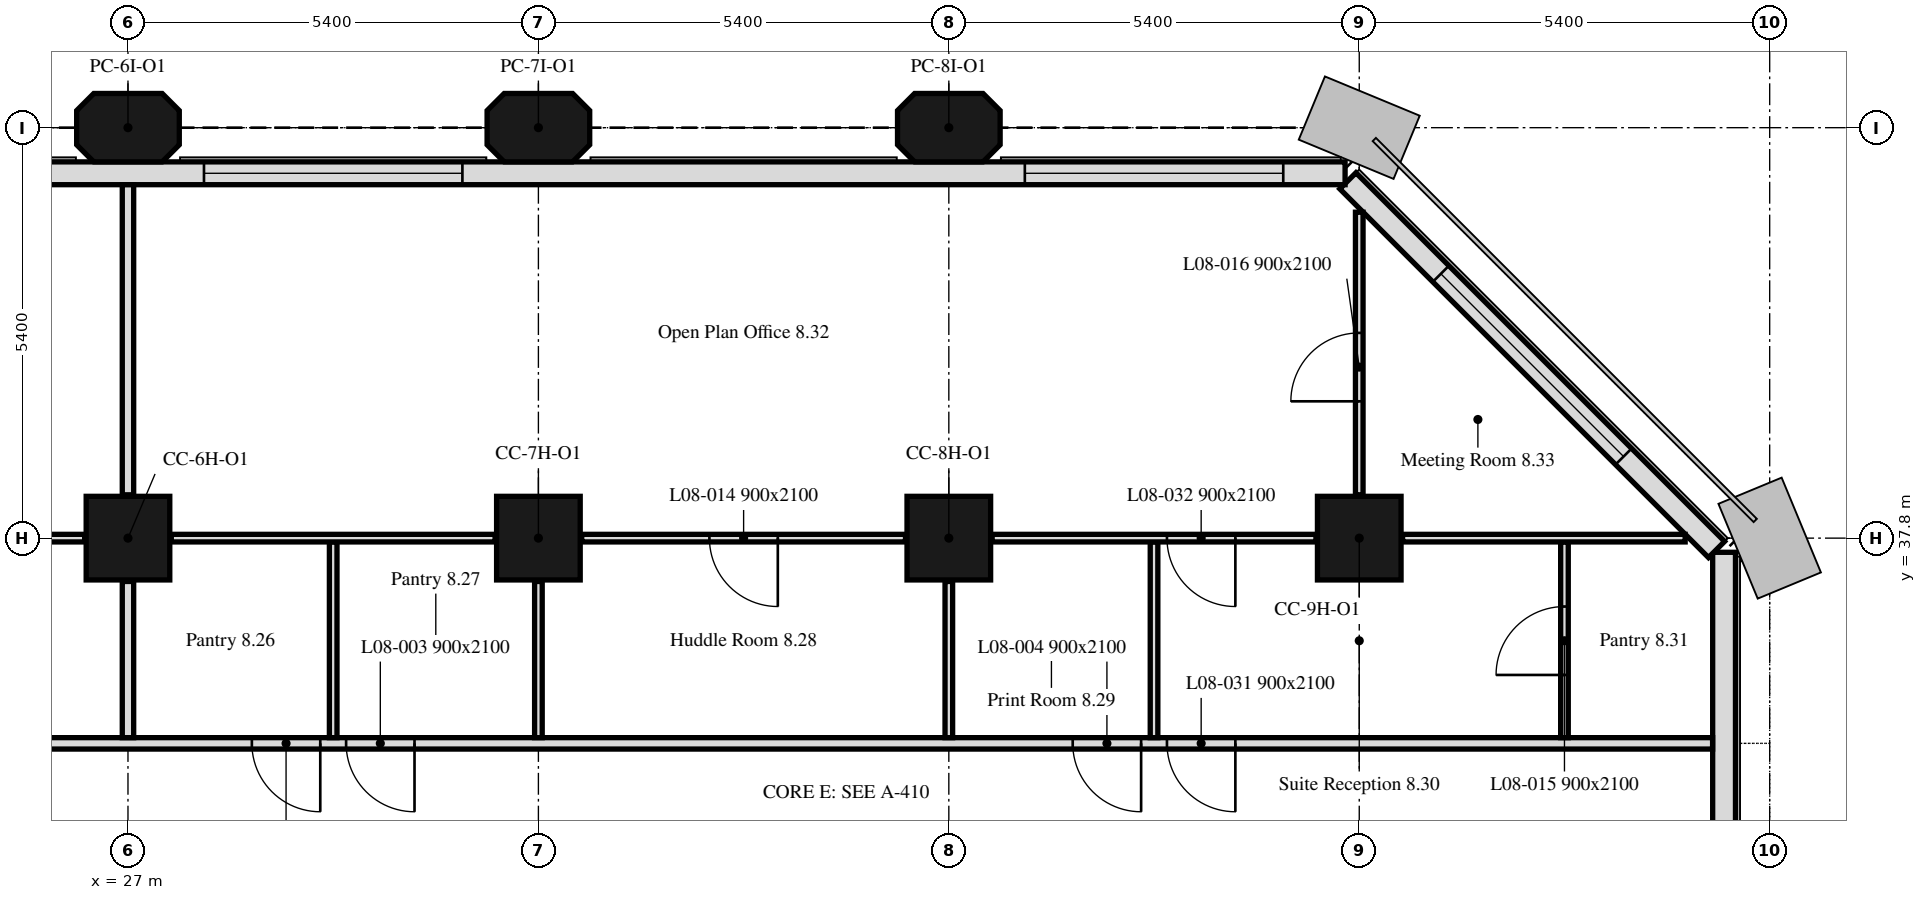
"""IFC4 building model, lengths in metres.
Left out: names, types, materials, properties, quantities, classifications, styles, units other than length and angle.
Written with IfcOpenShell. Run it as: python <this file> out.ifc"""

import sys

from ifc_helpers import new_model, si_unit, direction, frame, frame_2d, origin, origin_2d, place, context, subcontext, project, spatial, polyline, rectangle, outline, extrude, element, fill, save


model = new_model("IFC4")
c1 = context("Model", 3, precision=1e-05, world=origin(), true_north=direction((0.0, 1.0)))
c2 = subcontext(c1, "Body", "Model", "MODEL_VIEW")
j1 = project(units=[si_unit("LENGTHUNIT", "METRE"), si_unit("PLANEANGLEUNIT", "RADIAN")], contexts=[c1])
p1 = place(None, origin())
s1 = spatial("IfcSite", under=j1, at=p1, CompositionType="ELEMENT")
p2 = place(p1, origin())
s2 = spatial("IfcBuilding", under=s1, at=p2, CompositionType="ELEMENT")
p3 = place(p2, frame((0.0, 0.0, 41.2)))
s3 = spatial("IfcBuildingStorey", under=s2, at=p3, CompositionType="ELEMENT", Elevation=41.2)
for number, where, z_axis, x_axis in (
    (1, (27.0, 37.8, 0.0), (0.0, 0.0, 1.0), (1.0, 0.0, 0.0)),
    (2, (32.4, 37.8, 0.0), (0.0, 0.0, 1.0), (1.0, 0.0, 0.0)),
    (3, (37.8, 37.8, 0.0), (0.0, 0.0, 1.0), (1.0, 0.0, 0.0)),
    (4, (43.2, 37.8, 0.0), (0.0, 0.0, 1.0), (1.0, 0.0, 0.0)),
):
    element("IfcColumn", number, at=place(p3, frame(where, z_axis=z_axis, x_axis=x_axis)), inside=s3, PredefinedType="COLUMN", context=c2, shape_type="SweptSolid", body=[
        extrude(rectangle(XDim=1.1, YDim=1.1, at=origin_2d()), origin(), (0.0, 0.0, 1.0), 3.5),
    ])
for number, where, z_axis, x_axis in (
    (5, (27.0, 43.2, 0.0), (0.0, 0.0, 1.0), (1.0, 0.0, 0.0)),
    (6, (32.4, 43.2, 0.0), (0.0, 0.0, 1.0), (1.0, 0.0, 0.0)),
    (7, (37.8, 43.2, 0.0), (0.0, 0.0, 1.0), (1.0, 0.0, 0.0)),
):
    element("IfcColumn", number, at=place(p3, frame(where, z_axis=z_axis, x_axis=x_axis)), inside=s3, PredefinedType="COLUMN", context=c2, shape_type="SweptSolid", body=[
        extrude(outline(polyline([(-0.45, -0.45), (0.45, -0.45), (0.675, -0.225), (0.675, 0.225), (0.45, 0.45), (-0.45, 0.45), (-0.675, 0.225), (-0.675, -0.225), (-0.45, -0.45)])), origin(), (0.0, 0.0, 1.0), 3.5),
    ])
p4 = place(p3, frame((48.0, 5.586, 0.0), z_axis=(0.0, 0.0, 1.0), x_axis=(0.0, 1.0, 0.0)))
e8 = element("IfcWall", 8, at=p4, inside=s3, PredefinedType="SOLIDWALL", context=c2, shape_type="SweptSolid", body=[
    extrude(rectangle(XDim=32.027, YDim=0.3, at=frame_2d((16.014, 0.0))), origin(), (0.0, 0.0, 1.0), 3.5),
])
p5 = place(p4, frame((0.814, 0.0, 0.9)))
e9 = element("IfcOpeningElement", 9, at=p5, cuts=e8, PredefinedType="OPENING", context=c2, shape_type="SweptSolid", body=[
    extrude(rectangle(XDim=3.4, YDim=1.7, at=frame_2d((1.7, 0.85))), frame((0.0, 0.16, 0.0), z_axis=(0.0, -1.0, 0.0), x_axis=(1.0, 0.0, 0.0)), (0.0, 0.0, 1.0), 0.32),
])
p6 = place(p4, frame((11.614, 0.0, 0.9)))
e10 = element("IfcOpeningElement", 10, at=p6, cuts=e8, PredefinedType="OPENING", context=c2, shape_type="SweptSolid", body=[
    extrude(rectangle(XDim=3.4, YDim=1.7, at=frame_2d((1.7, 0.85))), frame((0.0, 0.16, 0.0), z_axis=(0.0, -1.0, 0.0), x_axis=(1.0, 0.0, 0.0)), (0.0, 0.0, 1.0), 0.32),
])
p7 = place(p4, frame((22.414, 0.0, 0.9)))
e11 = element("IfcOpeningElement", 11, at=p7, cuts=e8, PredefinedType="OPENING", context=c2, shape_type="SweptSolid", body=[
    extrude(rectangle(XDim=3.4, YDim=1.7, at=frame_2d((1.7, 0.85))), frame((0.0, 0.16, 0.0), z_axis=(0.0, -1.0, 0.0), x_axis=(1.0, 0.0, 0.0)), (0.0, 0.0, 1.0), 0.32),
])
p8 = place(p3, frame((47.901, 37.65, 0.0), z_axis=(0.0, 0.0, 1.0), x_axis=(-0.707106781187, 0.707106781187, 0.0)))
e12 = element("IfcWall", 12, at=p8, inside=s3, PredefinedType="SOLIDWALL", context=c2, shape_type="SweptSolid", body=[
    extrude(rectangle(XDim=6.86, YDim=0.3, at=frame_2d((3.43, 0.0))), origin(), (0.0, 0.0, 1.0), 3.5),
])
p9 = place(p8, frame((1.73, 0.0, 0.9)))
e13 = element("IfcOpeningElement", 13, at=p9, cuts=e12, PredefinedType="OPENING", context=c2, shape_type="SweptSolid", body=[
    extrude(rectangle(XDim=3.4, YDim=1.7, at=frame_2d((1.7, 0.85))), frame((0.0, 0.16, 0.0), z_axis=(0.0, -1.0, 0.0), x_axis=(1.0, 0.0, 0.0)), (0.0, 0.0, 1.0), 0.32),
])
p10 = place(p3, frame((43.014, 42.6, 0.0), z_axis=(0.0, 0.0, 1.0), x_axis=(-1.0, 0.0, 0.0)))
e14 = element("IfcWall", 14, at=p10, inside=s3, PredefinedType="SOLIDWALL", context=c2, shape_type="SweptSolid", body=[
    extrude(rectangle(XDim=32.027, YDim=0.3, at=frame_2d((16.014, 0.0))), origin(), (0.0, 0.0, 1.0), 3.5),
])
p11 = place(p10, frame((0.814, 0.0, 0.9)))
e15 = element("IfcOpeningElement", 15, at=p11, cuts=e14, PredefinedType="OPENING", context=c2, shape_type="SweptSolid", body=[
    extrude(rectangle(XDim=3.4, YDim=1.7, at=frame_2d((1.7, 0.85))), frame((0.0, 0.16, 0.0), z_axis=(0.0, -1.0, 0.0), x_axis=(1.0, 0.0, 0.0)), (0.0, 0.0, 1.0), 0.32),
])
p12 = place(p10, frame((11.614, 0.0, 0.9)))
e16 = element("IfcOpeningElement", 16, at=p12, cuts=e14, PredefinedType="OPENING", context=c2, shape_type="SweptSolid", body=[
    extrude(rectangle(XDim=3.4, YDim=1.7, at=frame_2d((1.7, 0.85))), frame((0.0, 0.16, 0.0), z_axis=(0.0, -1.0, 0.0), x_axis=(1.0, 0.0, 0.0)), (0.0, 0.0, 1.0), 0.32),
])
p13 = place(p10, frame((22.414, 0.0, 0.9)))
e17 = element("IfcOpeningElement", 17, at=p13, cuts=e14, PredefinedType="OPENING", context=c2, shape_type="SweptSolid", body=[
    extrude(rectangle(XDim=3.4, YDim=1.7, at=frame_2d((1.7, 0.85))), frame((0.0, 0.16, 0.0), z_axis=(0.0, -1.0, 0.0), x_axis=(1.0, 0.0, 0.0)), (0.0, 0.0, 1.0), 0.32),
])
p14 = place(p3, frame((47.849, 35.1, 0.0), z_axis=(0.0, 0.0, 1.0), x_axis=(-1.0, 0.0, 0.0)))
e18 = element("IfcWall", 18, at=p14, inside=s3, PredefinedType="PARTITIONING", context=c2, shape_type="SweptSolid", body=[
    extrude(rectangle(XDim=41.698, YDim=0.15, at=frame_2d((20.849, 0.0))), origin(), (0.0, 0.0, 1.0), 3.5),
])
p15 = place(p14, frame((29.119, 0.0, 0.0)))
e19 = element("IfcOpeningElement", 19, at=p15, cuts=e18, PredefinedType="OPENING", context=c2, shape_type="SweptSolid", body=[
    extrude(rectangle(XDim=0.9, YDim=2.1, at=frame_2d((0.45, 1.05))), frame((0.0, 0.075, 0.0), z_axis=(0.0, -1.0, 0.0), x_axis=(1.0, 0.0, 0.0)), (0.0, 0.0, 1.0), 0.15),
])
p16 = place(p14, frame((18.319, 0.0, 0.0)))
e20 = element("IfcOpeningElement", 20, at=p16, cuts=e18, PredefinedType="OPENING", context=c2, shape_type="SweptSolid", body=[
    extrude(rectangle(XDim=0.9, YDim=2.1, at=frame_2d((0.45, 1.05))), frame((0.0, 0.075, 0.0), z_axis=(0.0, -1.0, 0.0), x_axis=(1.0, 0.0, 0.0)), (0.0, 0.0, 1.0), 0.15),
])
p17 = place(p14, frame((17.079, 0.0, 0.0)))
e21 = element("IfcOpeningElement", 21, at=p17, cuts=e18, PredefinedType="OPENING", context=c2, shape_type="SweptSolid", body=[
    extrude(rectangle(XDim=0.9, YDim=2.1, at=frame_2d((0.45, 1.05))), frame((0.0, 0.075, 0.0), z_axis=(0.0, -1.0, 0.0), x_axis=(1.0, 0.0, 0.0)), (0.0, 0.0, 1.0), 0.15),
])
p18 = place(p14, frame((7.519, 0.0, 0.0)))
e22 = element("IfcOpeningElement", 22, at=p18, cuts=e18, PredefinedType="OPENING", context=c2, shape_type="SweptSolid", body=[
    extrude(rectangle(XDim=0.9, YDim=2.1, at=frame_2d((0.45, 1.05))), frame((0.0, 0.075, 0.0), z_axis=(0.0, -1.0, 0.0), x_axis=(1.0, 0.0, 0.0)), (0.0, 0.0, 1.0), 0.15),
])
p19 = place(p14, frame((38.624, 0.0, 0.0)))
e23 = element("IfcOpeningElement", 23, at=p19, cuts=e18, PredefinedType="OPENING", context=c2, shape_type="SweptSolid", body=[
    extrude(rectangle(XDim=0.9, YDim=2.1, at=frame_2d((0.45, 1.05))), frame((0.0, 0.075, 0.0), z_axis=(0.0, -1.0, 0.0), x_axis=(1.0, 0.0, 0.0)), (0.0, 0.0, 1.0), 0.15),
])
p20 = place(p14, frame((6.279, 0.0, 0.0)))
e24 = element("IfcOpeningElement", 24, at=p20, cuts=e18, PredefinedType="OPENING", context=c2, shape_type="SweptSolid", body=[
    extrude(rectangle(XDim=0.9, YDim=2.1, at=frame_2d((0.45, 1.05))), frame((0.0, 0.075, 0.0), z_axis=(0.0, -1.0, 0.0), x_axis=(1.0, 0.0, 0.0)), (0.0, 0.0, 1.0), 0.15),
])
p21 = place(p3, frame((27.0, 35.175, 0.0), z_axis=(0.0, 0.0, 1.0), x_axis=(0.0, 1.0, 0.0)))
e25 = element("IfcWall", 25, at=p21, inside=s3, PredefinedType="PARTITIONING", context=c2, shape_type="SweptSolid", body=[
    extrude(rectangle(XDim=2.055, YDim=0.15, at=frame_2d((1.027, 0.0))), origin(), (0.0, 0.0, 1.0), 3.5),
])
p22 = place(p3, frame((26.43, 37.8, 0.0), z_axis=(0.0, 0.0, 1.0), x_axis=(-1.0, 0.0, 0.0)))
e26 = element("IfcWall", 26, at=p22, inside=s3, PredefinedType="PARTITIONING", context=c2, shape_type="SweptSolid", body=[
    extrude(rectangle(XDim=4.26, YDim=0.1, at=frame_2d((2.13, 0.0))), origin(), (0.0, 0.0, 1.0), 3.5),
])
p23 = place(p22, frame((1.68, 0.0, 0.0)))
e27 = element("IfcOpeningElement", 27, at=p23, cuts=e26, PredefinedType="OPENING", context=c2, shape_type="SweptSolid", body=[
    extrude(rectangle(XDim=0.9, YDim=2.1, at=frame_2d((0.45, 1.05))), frame((0.0, 0.05, 0.0), z_axis=(0.0, -1.0, 0.0), x_axis=(1.0, 0.0, 0.0)), (0.0, 0.0, 1.0), 0.1),
])
p24 = place(p3, frame((27.0, 38.37, 0.0), z_axis=(0.0, 0.0, 1.0), x_axis=(0.0, 1.0, 0.0)))
e28 = element("IfcWall", 28, at=p24, inside=s3, PredefinedType="PARTITIONING", context=c2, shape_type="SweptSolid", body=[
    extrude(rectangle(XDim=4.079, YDim=0.15, at=frame_2d((2.04, 0.0))), origin(), (0.0, 0.0, 1.0), 3.5),
])
p25 = place(p3, frame((29.7, 35.175, 0.0), z_axis=(0.0, 0.0, 1.0), x_axis=(0.0, 1.0, 0.0)))
e29 = element("IfcWall", 29, at=p25, inside=s3, PredefinedType="PARTITIONING", context=c2, shape_type="SweptSolid", body=[
    extrude(rectangle(XDim=2.575, YDim=0.1, at=frame_2d((1.288, 0.0))), origin(), (0.0, 0.0, 1.0), 3.5),
])
p26 = place(p3, frame((32.4, 35.175, 0.0), z_axis=(0.0, 0.0, 1.0), x_axis=(0.0, 1.0, 0.0)))
e30 = element("IfcWall", 30, at=p26, inside=s3, PredefinedType="PARTITIONING", context=c2, shape_type="SweptSolid", body=[
    extrude(rectangle(XDim=2.055, YDim=0.1, at=frame_2d((1.027, 0.0))), origin(), (0.0, 0.0, 1.0), 3.5),
])
p27 = place(p3, frame((31.83, 37.8, 0.0), z_axis=(0.0, 0.0, 1.0), x_axis=(-1.0, 0.0, 0.0)))
e31 = element("IfcWall", 31, at=p27, inside=s3, PredefinedType="PARTITIONING", context=c2, shape_type="SweptSolid", body=[
    extrude(rectangle(XDim=4.26, YDim=0.1, at=frame_2d((2.13, 0.0))), origin(), (0.0, 0.0, 1.0), 3.5),
])
p28 = place(p3, frame((37.8, 35.175, 0.0), z_axis=(0.0, 0.0, 1.0), x_axis=(0.0, 1.0, 0.0)))
e32 = element("IfcWall", 32, at=p28, inside=s3, PredefinedType="PARTITIONING", context=c2, shape_type="SweptSolid", body=[
    extrude(rectangle(XDim=2.055, YDim=0.1, at=frame_2d((1.027, 0.0))), origin(), (0.0, 0.0, 1.0), 3.5),
])
p29 = place(p3, frame((37.23, 37.8, 0.0), z_axis=(0.0, 0.0, 1.0), x_axis=(-1.0, 0.0, 0.0)))
e33 = element("IfcWall", 33, at=p29, inside=s3, PredefinedType="PARTITIONING", context=c2, shape_type="SweptSolid", body=[
    extrude(rectangle(XDim=4.26, YDim=0.1, at=frame_2d((2.13, 0.0))), origin(), (0.0, 0.0, 1.0), 3.5),
])
p30 = place(p29, frame((1.68, 0.0, 0.0)))
e34 = element("IfcOpeningElement", 34, at=p30, cuts=e33, PredefinedType="OPENING", context=c2, shape_type="SweptSolid", body=[
    extrude(rectangle(XDim=0.9, YDim=2.1, at=frame_2d((0.45, 1.05))), frame((0.0, 0.05, 0.0), z_axis=(0.0, -1.0, 0.0), x_axis=(1.0, 0.0, 0.0)), (0.0, 0.0, 1.0), 0.1),
])
p31 = place(p3, frame((40.5, 35.175, 0.0), z_axis=(0.0, 0.0, 1.0), x_axis=(0.0, 1.0, 0.0)))
e35 = element("IfcWall", 35, at=p31, inside=s3, PredefinedType="PARTITIONING", context=c2, shape_type="SweptSolid", body=[
    extrude(rectangle(XDim=2.575, YDim=0.1, at=frame_2d((1.288, 0.0))), origin(), (0.0, 0.0, 1.0), 3.5),
])
p32 = place(p3, frame((45.9, 35.175, 0.0), z_axis=(0.0, 0.0, 1.0), x_axis=(0.0, 1.0, 0.0)))
e36 = element("IfcWall", 36, at=p32, inside=s3, PredefinedType="PARTITIONING", context=c2, shape_type="SweptSolid", body=[
    extrude(rectangle(XDim=2.575, YDim=0.1, at=frame_2d((1.288, 0.0))), origin(), (0.0, 0.0, 1.0), 3.5),
])
p33 = place(p32, frame((0.825, 0.0, 0.0)))
e37 = element("IfcOpeningElement", 37, at=p33, cuts=e36, PredefinedType="OPENING", context=c2, shape_type="SweptSolid", body=[
    extrude(rectangle(XDim=0.9, YDim=2.1, at=frame_2d((0.45, 1.05))), frame((0.0, 0.05, 0.0), z_axis=(0.0, -1.0, 0.0), x_axis=(1.0, 0.0, 0.0)), (0.0, 0.0, 1.0), 0.1),
])
p34 = place(p3, frame((42.63, 37.8, 0.0), z_axis=(0.0, 0.0, 1.0), x_axis=(-1.0, 0.0, 0.0)))
e38 = element("IfcWall", 38, at=p34, inside=s3, PredefinedType="PARTITIONING", context=c2, shape_type="SweptSolid", body=[
    extrude(rectangle(XDim=4.26, YDim=0.1, at=frame_2d((2.13, 0.0))), origin(), (0.0, 0.0, 1.0), 3.5),
])
p35 = place(p34, frame((1.06, 0.0, 0.0)))
e39 = element("IfcOpeningElement", 39, at=p35, cuts=e38, PredefinedType="OPENING", context=c2, shape_type="SweptSolid", body=[
    extrude(rectangle(XDim=0.9, YDim=2.1, at=frame_2d((0.45, 1.05))), frame((0.0, 0.05, 0.0), z_axis=(0.0, -1.0, 0.0), x_axis=(1.0, 0.0, 0.0)), (0.0, 0.0, 1.0), 0.1),
])
p36 = place(p3, frame((47.488, 37.8, 0.0), z_axis=(0.0, 0.0, 1.0), x_axis=(-1.0, 0.0, 0.0)))
e40 = element("IfcWall", 40, at=p36, inside=s3, PredefinedType="PARTITIONING", context=c2, shape_type="SweptSolid", body=[
    extrude(rectangle(XDim=3.718, YDim=0.1, at=frame_2d((1.859, 0.0))), origin(), (0.0, 0.0, 1.0), 3.5),
])
p37 = place(p3, frame((43.2, 38.37, 0.0), z_axis=(0.0, 0.0, 1.0), x_axis=(0.0, 1.0, 0.0)))
e41 = element("IfcWall", 41, at=p37, inside=s3, PredefinedType="PARTITIONING", context=c2, shape_type="SweptSolid", body=[
    extrude(rectangle(XDim=3.718, YDim=0.1, at=frame_2d((1.859, 0.0))), origin(), (0.0, 0.0, 1.0), 3.5),
])
p38 = place(p37, frame((1.23, 0.0, 0.0)))
e42 = element("IfcOpeningElement", 42, at=p38, cuts=e41, PredefinedType="OPENING", context=c2, shape_type="SweptSolid", body=[
    extrude(rectangle(XDim=0.9, YDim=2.1, at=frame_2d((0.45, 1.05))), frame((0.0, 0.05, 0.0), z_axis=(0.0, -1.0, 0.0), x_axis=(1.0, 0.0, 0.0)), (0.0, 0.0, 1.0), 0.1),
])
p39 = place(p9, origin())
e43 = element("IfcWindow", 43, at=p39, inside=s3, PartitioningType="SINGLE_PANEL", PredefinedType="WINDOW", context=c2, shape_type="SweptSolid", body=[
    extrude(rectangle(XDim=3.4, YDim=1.7, at=frame_2d((1.7, 0.85))), frame((0.0, 0.03, 0.0), z_axis=(0.0, -1.0, 0.0), x_axis=(1.0, 0.0, 0.0)), (0.0, 0.0, 1.0), 0.06),
])
fill(e13, e43)
p40 = place(p11, origin())
e44 = element("IfcWindow", 44, at=p40, inside=s3, PartitioningType="SINGLE_PANEL", PredefinedType="WINDOW", context=c2, shape_type="SweptSolid", body=[
    extrude(rectangle(XDim=3.4, YDim=1.7, at=frame_2d((1.7, 0.85))), frame((0.0, 0.03, 0.0), z_axis=(0.0, -1.0, 0.0), x_axis=(1.0, 0.0, 0.0)), (0.0, 0.0, 1.0), 0.06),
])
fill(e15, e44)
p41 = place(p12, origin())
e45 = element("IfcWindow", 45, at=p41, inside=s3, PartitioningType="SINGLE_PANEL", PredefinedType="WINDOW", context=c2, shape_type="SweptSolid", body=[
    extrude(rectangle(XDim=3.4, YDim=1.7, at=frame_2d((1.7, 0.85))), frame((0.0, 0.03, 0.0), z_axis=(0.0, -1.0, 0.0), x_axis=(1.0, 0.0, 0.0)), (0.0, 0.0, 1.0), 0.06),
])
fill(e16, e45)
p42 = place(p16, origin())
e46 = element("IfcDoor", 46, at=p42, inside=s3, OperationType="SINGLE_SWING_LEFT", PredefinedType="DOOR", context=c2, shape_type="SweptSolid", body=[
    extrude(rectangle(XDim=0.9, YDim=2.1, at=frame_2d((0.45, 1.05))), frame((0.0, 0.025, 0.0), z_axis=(0.0, -1.0, 0.0), x_axis=(1.0, 0.0, 0.0)), (0.0, 0.0, 1.0), 0.05),
])
fill(e20, e46)
p43 = place(p17, origin())
e47 = element("IfcDoor", 47, at=p43, inside=s3, OperationType="SINGLE_SWING_LEFT", PredefinedType="DOOR", context=c2, shape_type="SweptSolid", body=[
    extrude(rectangle(XDim=0.9, YDim=2.1, at=frame_2d((0.45, 1.05))), frame((0.0, 0.025, 0.0), z_axis=(0.0, -1.0, 0.0), x_axis=(1.0, 0.0, 0.0)), (0.0, 0.0, 1.0), 0.05),
])
fill(e21, e47)
p44 = place(p18, origin())
e48 = element("IfcDoor", 48, at=p44, inside=s3, OperationType="SINGLE_SWING_LEFT", PredefinedType="DOOR", context=c2, shape_type="SweptSolid", body=[
    extrude(rectangle(XDim=0.9, YDim=2.1, at=frame_2d((0.45, 1.05))), frame((0.0, 0.025, 0.0), z_axis=(0.0, -1.0, 0.0), x_axis=(1.0, 0.0, 0.0)), (0.0, 0.0, 1.0), 0.05),
])
fill(e22, e48)
p45 = place(p30, origin())
e49 = element("IfcDoor", 49, at=p45, inside=s3, OperationType="SINGLE_SWING_RIGHT", PredefinedType="DOOR", context=c2, shape_type="SweptSolid", body=[
    extrude(rectangle(XDim=0.9, YDim=2.1, at=frame_2d((0.45, 1.05))), frame((0.0, 0.025, 0.0), z_axis=(0.0, -1.0, 0.0), x_axis=(1.0, 0.0, 0.0)), (0.0, 0.0, 1.0), 0.05),
])
fill(e34, e49)
p46 = place(p33, origin())
e50 = element("IfcDoor", 50, at=p46, inside=s3, OperationType="SINGLE_SWING_RIGHT", PredefinedType="DOOR", context=c2, shape_type="SweptSolid", body=[
    extrude(rectangle(XDim=0.9, YDim=2.1, at=frame_2d((0.45, 1.05))), frame((0.0, 0.025, 0.0), z_axis=(0.0, -1.0, 0.0), x_axis=(1.0, 0.0, 0.0)), (0.0, 0.0, 1.0), 0.05),
])
fill(e37, e50)
p47 = place(p38, origin())
e51 = element("IfcDoor", 51, at=p47, inside=s3, OperationType="SINGLE_SWING_LEFT", PredefinedType="DOOR", context=c2, shape_type="SweptSolid", body=[
    extrude(rectangle(XDim=0.9, YDim=2.1, at=frame_2d((0.45, 1.05))), frame((0.0, 0.025, 0.0), z_axis=(0.0, -1.0, 0.0), x_axis=(1.0, 0.0, 0.0)), (0.0, 0.0, 1.0), 0.05),
])
fill(e42, e51)
p48 = place(p20, origin())
e52 = element("IfcDoor", 52, at=p48, inside=s3, OperationType="SINGLE_SWING_RIGHT", PredefinedType="DOOR", context=c2, shape_type="SweptSolid", body=[
    extrude(rectangle(XDim=0.9, YDim=2.1, at=frame_2d((0.45, 1.05))), frame((0.0, 0.025, 0.0), z_axis=(0.0, -1.0, 0.0), x_axis=(1.0, 0.0, 0.0)), (0.0, 0.0, 1.0), 0.05),
])
fill(e24, e52)
p49 = place(p35, origin())
e53 = element("IfcDoor", 53, at=p49, inside=s3, OperationType="SINGLE_SWING_RIGHT", PredefinedType="DOOR", context=c2, shape_type="SweptSolid", body=[
    extrude(rectangle(XDim=0.9, YDim=2.1, at=frame_2d((0.45, 1.05))), frame((0.0, 0.025, 0.0), z_axis=(0.0, -1.0, 0.0), x_axis=(1.0, 0.0, 0.0)), (0.0, 0.0, 1.0), 0.05),
])
fill(e39, e53)
save(model, sys.argv[1])
